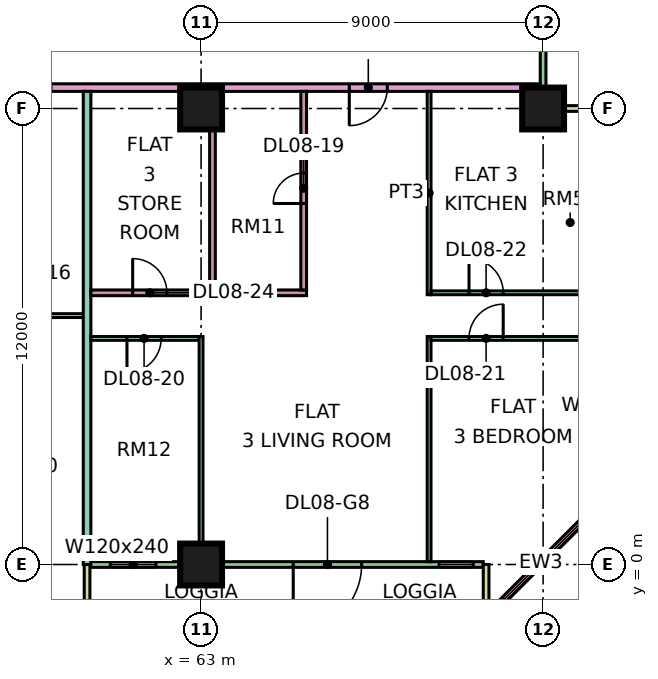
"""IFC4 building model, lengths in metres.
Left out: names, types, materials, properties, quantities, classifications, styles, units other than length and angle.
Written with IfcOpenShell. Run it as: python <this file> out.ifc"""

import sys

from ifc_helpers import new_model, si_unit, direction, frame, frame_2d, origin, origin_2d, place, context, subcontext, project, spatial, rectangle, extrude, element, fill, save


model = new_model("IFC4")
c1 = context("Model", 3, precision=1e-05, world=origin(), true_north=direction((0.0, 1.0)))
c2 = subcontext(c1, "Body", "Model", "MODEL_VIEW")
j1 = project(units=[si_unit("LENGTHUNIT", "METRE"), si_unit("PLANEANGLEUNIT", "RADIAN")], contexts=[c1])
p1 = place(None, origin())
s1 = spatial("IfcSite", under=j1, at=p1, CompositionType="ELEMENT")
p2 = place(p1, origin())
s2 = spatial("IfcBuilding", under=s1, at=p2, CompositionType="ELEMENT")
p3 = place(p2, frame((0.0, 0.0, 45.15)))
s3 = spatial("IfcBuildingStorey", under=s2, at=p3, CompositionType="ELEMENT", Elevation=45.15)
for number, where, z_axis, x_axis in (
    (1, (63.0, 0.0, 0.0), (0.0, 0.0, 1.0), (1.0, 0.0, 0.0)),
    (2, (63.0, 12.0, 0.0), (0.0, 0.0, 1.0), (1.0, 0.0, 0.0)),
    (3, (72.0, 12.0, 0.0), (0.0, 0.0, 1.0), (1.0, 0.0, 0.0)),
):
    element("IfcColumn", number, at=place(p3, frame(where, z_axis=z_axis, x_axis=x_axis)), inside=s3, PredefinedType="COLUMN", context=c2, shape_type="SweptSolid", body=[
        extrude(rectangle(XDim=1.1, YDim=1.1, at=origin_2d()), origin(), (0.0, 0.0, 1.0), 3.75),
    ])
p4 = place(p3, frame((60.075, 0.0, 0.0), z_axis=(0.0, 0.0, 1.0), x_axis=(1.0, 0.0, 0.0)))
e4 = element("IfcWall", 4, at=p4, inside=s3, PredefinedType="SOLIDWALL", context=c2, shape_type="SweptSolid", body=[
    extrude(rectangle(XDim=10.35, YDim=0.15, at=frame_2d((5.175, 0.0))), origin(), (0.0, 0.0, 1.0), 3.35),
])
p5 = place(p4, frame((0.538, 0.0, 0.45)))
e5 = element("IfcOpeningElement", 5, at=p5, cuts=e4, PredefinedType="OPENING", context=c2, shape_type="SweptSolid", body=[
    extrude(rectangle(XDim=1.2, YDim=2.4, at=frame_2d((0.6, 1.2))), frame((0.0, 0.085, 0.0), z_axis=(0.0, -1.0, 0.0), x_axis=(1.0, 0.0, 0.0)), (0.0, 0.0, 1.0), 0.17),
])
p6 = place(p4, frame((5.35, 0.0, 0.0)))
e6 = element("IfcOpeningElement", 6, at=p6, cuts=e4, PredefinedType="OPENING", context=c2, shape_type="SweptSolid", body=[
    extrude(rectangle(XDim=1.8, YDim=2.4, at=frame_2d((0.9, 1.2))), frame((0.0, 0.085, 0.0), z_axis=(0.0, -1.0, 0.0), x_axis=(1.0, 0.0, 0.0)), (0.0, 0.0, 1.0), 0.17),
])
p7 = place(p4, frame((9.188, 0.0, 0.45)))
e7 = element("IfcOpeningElement", 7, at=p7, cuts=e4, PredefinedType="OPENING", context=c2, shape_type="SweptSolid", body=[
    extrude(rectangle(XDim=0.9, YDim=2.4, at=frame_2d((0.45, 1.2))), frame((0.0, 0.085, 0.0), z_axis=(0.0, -1.0, 0.0), x_axis=(1.0, 0.0, 0.0)), (0.0, 0.0, 1.0), 0.17),
])
for number, where, z_axis, x_axis in (
    (8, (60.0, -1.5, 0.0), (0.0, 0.0, 1.0), (0.0, 1.0, 0.0)),
    (9, (70.5, -1.5, 0.0), (0.0, 0.0, 1.0), (0.0, 1.0, 0.0)),
):
    element("IfcWall", number, at=place(p3, frame(where, z_axis=z_axis, x_axis=x_axis)), inside=s3, PredefinedType="SOLIDWALL", context=c2, shape_type="SweptSolid", body=[
        extrude(rectangle(XDim=1.5, YDim=0.15, at=frame_2d((0.75, 0.0))), origin(), (0.0, 0.0, 1.0), 3.35),
    ])
p8 = place(p3, frame((70.447, -1.447, 0.0), z_axis=(0.0, 0.0, 1.0), x_axis=(0.707106781187, 0.707106781187, 0.0)))
e10 = element("IfcWall", 10, at=p8, inside=s3, PredefinedType="SOLIDWALL", context=c2, shape_type="SweptSolid", body=[
    extrude(rectangle(XDim=4.243, YDim=0.15, at=frame_2d((2.121, 0.0))), origin(), (0.0, 0.0, 1.0), 3.35),
])
p9 = place(p8, frame((0.744, 0.0, 0.45)))
e11 = element("IfcOpeningElement", 11, at=p9, cuts=e10, PredefinedType="OPENING", context=c2, shape_type="SweptSolid", body=[
    extrude(rectangle(XDim=3.0, YDim=2.4, at=frame_2d((1.5, 1.2))), frame((0.0, 0.085, 0.0), z_axis=(0.0, -1.0, 0.0), x_axis=(1.0, 0.0, 0.0)), (0.0, 0.0, 1.0), 0.17),
])
p10 = place(p3, frame((72.0, 12.075, 0.0), z_axis=(0.0, 0.0, 1.0), x_axis=(0.0, 1.0, 0.0)))
e12 = element("IfcWall", 12, at=p10, inside=s3, PredefinedType="SOLIDWALL", context=c2, shape_type="SweptSolid", body=[
    extrude(rectangle(XDim=10.35, YDim=0.15, at=frame_2d((5.175, 0.0))), origin(), (0.0, 0.0, 1.0), 3.35),
])
p11 = place(p10, frame((4.575, 0.0, 1.7)))
e13 = element("IfcOpeningElement", 13, at=p11, cuts=e12, PredefinedType="OPENING", context=c2, shape_type="SweptSolid", body=[
    extrude(rectangle(XDim=1.2, YDim=0.9, at=frame_2d((0.6, 0.45))), frame((0.0, 0.085, 0.0), z_axis=(0.0, -1.0, 0.0), x_axis=(1.0, 0.0, 0.0)), (0.0, 0.0, 1.0), 0.17),
])
p12 = place(p10, frame((8.587, 0.0, 0.45)))
e14 = element("IfcOpeningElement", 14, at=p12, cuts=e12, PredefinedType="OPENING", context=c2, shape_type="SweptSolid", body=[
    extrude(rectangle(XDim=1.2, YDim=2.4, at=frame_2d((0.6, 1.2))), frame((0.0, 0.085, 0.0), z_axis=(0.0, -1.0, 0.0), x_axis=(1.0, 0.0, 0.0)), (0.0, 0.0, 1.0), 0.17),
])
p13 = place(p3, frame((73.5, 12.0, 0.0), z_axis=(0.0, 0.0, 1.0), x_axis=(-1.0, 0.0, 0.0)))
e15 = element("IfcWall", 15, at=p13, inside=s3, PredefinedType="SOLIDWALL", context=c2, shape_type="SweptSolid", body=[
    extrude(rectangle(XDim=1.5, YDim=0.15, at=frame_2d((0.75, 0.0))), origin(), (0.0, 0.0, 1.0), 3.35),
])
p14 = place(p3, frame((40.65, 12.55, 0.0), z_axis=(0.0, 0.0, 1.0), x_axis=(1.0, 0.0, 0.0)))
e16 = element("IfcWall", 16, at=p14, inside=s3, PredefinedType="PARTITIONING", context=c2, shape_type="SweptSolid", body=[
    extrude(rectangle(XDim=31.276, YDim=0.2, at=frame_2d((15.638, 0.0))), origin(), (0.0, 0.0, 1.0), 3.35),
])
p15 = place(p14, frame((17.4, 0.0, 0.0)))
e17 = element("IfcOpeningElement", 17, at=p15, cuts=e16, PredefinedType="OPENING", context=c2, shape_type="SweptSolid", body=[
    extrude(rectangle(XDim=1.0, YDim=2.1, at=frame_2d((0.5, 1.05))), frame((0.0, 0.11, 0.0), z_axis=(0.0, -1.0, 0.0), x_axis=(1.0, 0.0, 0.0)), (0.0, 0.0, 1.0), 0.22),
])
p16 = place(p14, frame((26.25, 0.0, 0.0)))
e18 = element("IfcOpeningElement", 18, at=p16, cuts=e16, PredefinedType="OPENING", context=c2, shape_type="SweptSolid", body=[
    extrude(rectangle(XDim=1.0, YDim=2.1, at=frame_2d((0.5, 1.05))), frame((0.0, 0.11, 0.0), z_axis=(0.0, -1.0, 0.0), x_axis=(1.0, 0.0, 0.0)), (0.0, 0.0, 1.0), 0.22),
])
p17 = place(p14, frame((1.05, 0.0, 0.0)))
e19 = element("IfcOpeningElement", 19, at=p17, cuts=e16, PredefinedType="OPENING", context=c2, shape_type="SweptSolid", body=[
    extrude(rectangle(XDim=1.0, YDim=2.1, at=frame_2d((0.5, 1.05))), frame((0.0, 0.11, 0.0), z_axis=(0.0, -1.0, 0.0), x_axis=(1.0, 0.0, 0.0)), (0.0, 0.0, 1.0), 0.22),
])
p18 = place(p3, frame((54.05, 6.55, 0.0), z_axis=(0.0, 0.0, 1.0), x_axis=(1.0, 0.0, 0.0)))
e20 = element("IfcWall", 20, at=p18, inside=s3, PredefinedType="PARTITIONING", context=c2, shape_type="SweptSolid", body=[
    extrude(rectangle(XDim=5.85, YDim=0.1, at=frame_2d((2.925, 0.0))), origin(), (0.0, 0.0, 1.0), 3.35),
])
p19 = place(p18, frame((1.0, 0.0, 0.0)))
e21 = element("IfcOpeningElement", 21, at=p19, cuts=e20, PredefinedType="OPENING", context=c2, shape_type="SweptSolid", body=[
    extrude(rectangle(XDim=0.9, YDim=2.1, at=frame_2d((0.45, 1.05))), frame((0.0, 0.06, 0.0), z_axis=(0.0, -1.0, 0.0), x_axis=(1.0, 0.0, 0.0)), (0.0, 0.0, 1.0), 0.12),
])
p20 = place(p18, frame((4.0, 0.0, 0.0)))
e22 = element("IfcOpeningElement", 22, at=p20, cuts=e20, PredefinedType="OPENING", context=c2, shape_type="SweptSolid", body=[
    extrude(rectangle(XDim=0.9, YDim=2.1, at=frame_2d((0.45, 1.05))), frame((0.0, 0.06, 0.0), z_axis=(0.0, -1.0, 0.0), x_axis=(1.0, 0.0, 0.0)), (0.0, 0.0, 1.0), 0.12),
])
p21 = place(p3, frame((60.0, 0.0, 0.0), z_axis=(0.0, 0.0, 1.0), x_axis=(0.0, 1.0, 0.0)))
e23 = element("IfcWall", 23, at=p21, inside=s3, PredefinedType="PARTITIONING", context=c2, shape_type="SweptSolid", body=[
    extrude(rectangle(XDim=12.45, YDim=0.2, at=frame_2d((6.225, 0.0))), origin(), (0.0, 0.0, 1.0), 3.35),
])
p22 = place(p3, frame((60.1, 5.95, 0.0), z_axis=(0.0, 0.0, 1.0), x_axis=(1.0, 0.0, 0.0)))
e24 = element("IfcWall", 24, at=p22, inside=s3, PredefinedType="PARTITIONING", context=c2, shape_type="SweptSolid", body=[
    extrude(rectangle(XDim=2.85, YDim=0.1, at=frame_2d((1.425, 0.0))), origin(), (0.0, 0.0, 1.0), 3.35),
])
p23 = place(p22, frame((0.95, 0.0, 0.0)))
e25 = element("IfcOpeningElement", 25, at=p23, cuts=e24, PredefinedType="OPENING", context=c2, shape_type="SweptSolid", body=[
    extrude(rectangle(XDim=0.9, YDim=2.1, at=frame_2d((0.45, 1.05))), frame((0.0, 0.06, 0.0), z_axis=(0.0, -1.0, 0.0), x_axis=(1.0, 0.0, 0.0)), (0.0, 0.0, 1.0), 0.12),
])
p24 = place(p3, frame((60.1, 7.15, 0.0), z_axis=(0.0, 0.0, 1.0), x_axis=(1.0, 0.0, 0.0)))
e26 = element("IfcWall", 26, at=p24, inside=s3, PredefinedType="PARTITIONING", context=c2, shape_type="SweptSolid", body=[
    extrude(rectangle(XDim=5.675, YDim=0.15, at=frame_2d((2.837, 0.0))), origin(), (0.0, 0.0, 1.0), 3.35),
])
p25 = place(p24, frame((1.1, 0.0, 0.0)))
e27 = element("IfcOpeningElement", 27, at=p25, cuts=e26, PredefinedType="OPENING", context=c2, shape_type="SweptSolid", body=[
    extrude(rectangle(XDim=0.9, YDim=2.1, at=frame_2d((0.45, 1.05))), frame((0.0, 0.085, 0.0), z_axis=(0.0, -1.0, 0.0), x_axis=(1.0, 0.0, 0.0)), (0.0, 0.0, 1.0), 0.17),
])
p26 = place(p3, frame((63.0, 0.074, 0.0), z_axis=(0.0, 0.0, 1.0), x_axis=(0.0, 1.0, 0.0)))
e28 = element("IfcWall", 28, at=p26, inside=s3, PredefinedType="PARTITIONING", context=c2, shape_type="SweptSolid", body=[
    extrude(rectangle(XDim=5.926, YDim=0.1, at=frame_2d((2.963, 0.0))), origin(), (0.0, 0.0, 1.0), 3.35),
])
p27 = place(p3, frame((63.3, 7.225, 0.0), z_axis=(0.0, 0.0, 1.0), x_axis=(0.0, 1.0, 0.0)))
e29 = element("IfcWall", 29, at=p27, inside=s3, PredefinedType="PARTITIONING", context=c2, shape_type="SweptSolid", body=[
    extrude(rectangle(XDim=5.225, YDim=0.15, at=frame_2d((2.612, 0.0))), origin(), (0.0, 0.0, 1.0), 3.35),
])
p28 = place(p3, frame((65.7, 7.225, 0.0), z_axis=(0.0, 0.0, 1.0), x_axis=(0.0, 1.0, 0.0)))
e30 = element("IfcWall", 30, at=p28, inside=s3, PredefinedType="PARTITIONING", context=c2, shape_type="SweptSolid", body=[
    extrude(rectangle(XDim=5.225, YDim=0.15, at=frame_2d((2.612, 0.0))), origin(), (0.0, 0.0, 1.0), 3.35),
])
p29 = place(p28, frame((2.275, 0.0, 0.0)))
e31 = element("IfcOpeningElement", 31, at=p29, cuts=e30, PredefinedType="OPENING", context=c2, shape_type="SweptSolid", body=[
    extrude(rectangle(XDim=0.8, YDim=2.1, at=frame_2d((0.4, 1.05))), frame((0.0, 0.085, 0.0), z_axis=(0.0, -1.0, 0.0), x_axis=(1.0, 0.0, 0.0)), (0.0, 0.0, 1.0), 0.17),
])
p30 = place(p3, frame((69.0, 0.074, 0.0), z_axis=(0.0, 0.0, 1.0), x_axis=(0.0, 1.0, 0.0)))
e32 = element("IfcWall", 32, at=p30, inside=s3, PredefinedType="PARTITIONING", context=c2, shape_type="SweptSolid", body=[
    extrude(rectangle(XDim=5.926, YDim=0.1, at=frame_2d((2.963, 0.0))), origin(), (0.0, 0.0, 1.0), 3.35),
])
p31 = place(p3, frame((69.0, 7.1, 0.0), z_axis=(0.0, 0.0, 1.0), x_axis=(0.0, 1.0, 0.0)))
e33 = element("IfcWall", 33, at=p31, inside=s3, PredefinedType="PARTITIONING", context=c2, shape_type="SweptSolid", body=[
    extrude(rectangle(XDim=5.35, YDim=0.1, at=frame_2d((2.675, 0.0))), origin(), (0.0, 0.0, 1.0), 3.35),
])
p32 = place(p3, frame((69.05, 5.95, 0.0), z_axis=(0.0, 0.0, 1.0), x_axis=(1.0, 0.0, 0.0)))
e34 = element("IfcWall", 34, at=p32, inside=s3, PredefinedType="PARTITIONING", context=c2, shape_type="SweptSolid", body=[
    extrude(rectangle(XDim=4.3, YDim=0.1, at=frame_2d((2.15, 0.0))), origin(), (0.0, 0.0, 1.0), 3.35),
])
p33 = place(p32, frame((1.0, 0.0, 0.0)))
e35 = element("IfcOpeningElement", 35, at=p33, cuts=e34, PredefinedType="OPENING", context=c2, shape_type="SweptSolid", body=[
    extrude(rectangle(XDim=0.9, YDim=2.1, at=frame_2d((0.45, 1.05))), frame((0.0, 0.06, 0.0), z_axis=(0.0, -1.0, 0.0), x_axis=(1.0, 0.0, 0.0)), (0.0, 0.0, 1.0), 0.12),
])
p34 = place(p3, frame((69.05, 7.15, 0.0), z_axis=(0.0, 0.0, 1.0), x_axis=(1.0, 0.0, 0.0)))
e36 = element("IfcWall", 36, at=p34, inside=s3, PredefinedType="PARTITIONING", context=c2, shape_type="SweptSolid", body=[
    extrude(rectangle(XDim=4.3, YDim=0.1, at=frame_2d((2.15, 0.0))), origin(), (0.0, 0.0, 1.0), 3.35),
])
p35 = place(p34, frame((1.0, 0.0, 0.0)))
e37 = element("IfcOpeningElement", 37, at=p35, cuts=e36, PredefinedType="OPENING", context=c2, shape_type="SweptSolid", body=[
    extrude(rectangle(XDim=0.9, YDim=2.1, at=frame_2d((0.45, 1.05))), frame((0.0, 0.06, 0.0), z_axis=(0.0, -1.0, 0.0), x_axis=(1.0, 0.0, 0.0)), (0.0, 0.0, 1.0), 0.12),
])
p36 = place(p5, origin())
e38 = element("IfcWindow", 38, at=p36, inside=s3, PartitioningType="SINGLE_PANEL", PredefinedType="WINDOW", context=c2, shape_type="SweptSolid", body=[
    extrude(rectangle(XDim=1.2, YDim=2.4, at=frame_2d((0.6, 1.2))), frame((0.0, 0.03, 0.0), z_axis=(0.0, -1.0, 0.0), x_axis=(1.0, 0.0, 0.0)), (0.0, 0.0, 1.0), 0.06),
])
fill(e5, e38)
p37 = place(p6, frame((1.8, 0.0, 0.0), z_axis=(0.0, 0.0, 1.0), x_axis=(-1.0, 0.0, 0.0)))
e39 = element("IfcDoor", 39, at=p37, inside=s3, OperationType="DOUBLE_DOOR_SINGLE_SWING", PredefinedType="DOOR", context=c2, shape_type="SweptSolid", body=[
    extrude(rectangle(XDim=1.8, YDim=2.4, at=frame_2d((0.9, 1.2))), frame((0.0, 0.025, 0.0), z_axis=(0.0, -1.0, 0.0), x_axis=(1.0, 0.0, 0.0)), (0.0, 0.0, 1.0), 0.05),
])
fill(e6, e39)
p38 = place(p7, origin())
e40 = element("IfcWindow", 40, at=p38, inside=s3, PartitioningType="SINGLE_PANEL", PredefinedType="WINDOW", context=c2, shape_type="SweptSolid", body=[
    extrude(rectangle(XDim=0.9, YDim=2.4, at=frame_2d((0.45, 1.2))), frame((0.0, 0.03, 0.0), z_axis=(0.0, -1.0, 0.0), x_axis=(1.0, 0.0, 0.0)), (0.0, 0.0, 1.0), 0.06),
])
fill(e7, e40)
p39 = place(p9, origin())
e41 = element("IfcWindow", 41, at=p39, inside=s3, PartitioningType="SINGLE_PANEL", PredefinedType="WINDOW", context=c2, shape_type="SweptSolid", body=[
    extrude(rectangle(XDim=3.0, YDim=2.4, at=frame_2d((1.5, 1.2))), frame((0.0, 0.03, 0.0), z_axis=(0.0, -1.0, 0.0), x_axis=(1.0, 0.0, 0.0)), (0.0, 0.0, 1.0), 0.06),
])
fill(e11, e41)
p40 = place(p29, origin())
e42 = element("IfcDoor", 42, at=p40, inside=s3, OperationType="SINGLE_SWING_LEFT", PredefinedType="DOOR", context=c2, shape_type="SweptSolid", body=[
    extrude(rectangle(XDim=0.8, YDim=2.1, at=frame_2d((0.4, 1.05))), frame((0.0, 0.025, 0.0), z_axis=(0.0, -1.0, 0.0), x_axis=(1.0, 0.0, 0.0)), (0.0, 0.0, 1.0), 0.05),
])
fill(e31, e42)
p41 = place(p23, frame((0.9, 0.0, 0.0), z_axis=(0.0, 0.0, 1.0), x_axis=(-1.0, 0.0, 0.0)))
e43 = element("IfcDoor", 43, at=p41, inside=s3, OperationType="SINGLE_SWING_LEFT", PredefinedType="DOOR", context=c2, shape_type="SweptSolid", body=[
    extrude(rectangle(XDim=0.9, YDim=2.1, at=frame_2d((0.45, 1.05))), frame((0.0, 0.025, 0.0), z_axis=(0.0, -1.0, 0.0), x_axis=(1.0, 0.0, 0.0)), (0.0, 0.0, 1.0), 0.05),
])
fill(e25, e43)
p42 = place(p33, frame((0.9, 0.0, 0.0), z_axis=(0.0, 0.0, 1.0), x_axis=(-1.0, 0.0, 0.0)))
e44 = element("IfcDoor", 44, at=p42, inside=s3, OperationType="SINGLE_SWING_RIGHT", PredefinedType="DOOR", context=c2, shape_type="SweptSolid", body=[
    extrude(rectangle(XDim=0.9, YDim=2.1, at=frame_2d((0.45, 1.05))), frame((0.0, 0.025, 0.0), z_axis=(0.0, -1.0, 0.0), x_axis=(1.0, 0.0, 0.0)), (0.0, 0.0, 1.0), 0.05),
])
fill(e35, e44)
p43 = place(p35, origin())
e45 = element("IfcDoor", 45, at=p43, inside=s3, OperationType="SINGLE_SWING_LEFT", PredefinedType="DOOR", context=c2, shape_type="SweptSolid", body=[
    extrude(rectangle(XDim=0.9, YDim=2.1, at=frame_2d((0.45, 1.05))), frame((0.0, 0.025, 0.0), z_axis=(0.0, -1.0, 0.0), x_axis=(1.0, 0.0, 0.0)), (0.0, 0.0, 1.0), 0.05),
])
fill(e37, e45)
p44 = place(p16, frame((1.0, 0.0, 0.0), z_axis=(0.0, 0.0, 1.0), x_axis=(-1.0, 0.0, 0.0)))
e46 = element("IfcDoor", 46, at=p44, inside=s3, OperationType="SINGLE_SWING_LEFT", PredefinedType="DOOR", context=c2, shape_type="SweptSolid", body=[
    extrude(rectangle(XDim=1.0, YDim=2.1, at=frame_2d((0.5, 1.05))), frame((0.0, 0.025, 0.0), z_axis=(0.0, -1.0, 0.0), x_axis=(1.0, 0.0, 0.0)), (0.0, 0.0, 1.0), 0.05),
])
fill(e18, e46)
p45 = place(p25, origin())
e47 = element("IfcDoor", 47, at=p45, inside=s3, OperationType="SINGLE_SWING_LEFT", PredefinedType="DOOR", context=c2, shape_type="SweptSolid", body=[
    extrude(rectangle(XDim=0.9, YDim=2.1, at=frame_2d((0.45, 1.05))), frame((0.0, 0.025, 0.0), z_axis=(0.0, -1.0, 0.0), x_axis=(1.0, 0.0, 0.0)), (0.0, 0.0, 1.0), 0.05),
])
fill(e27, e47)
save(model, sys.argv[1])
